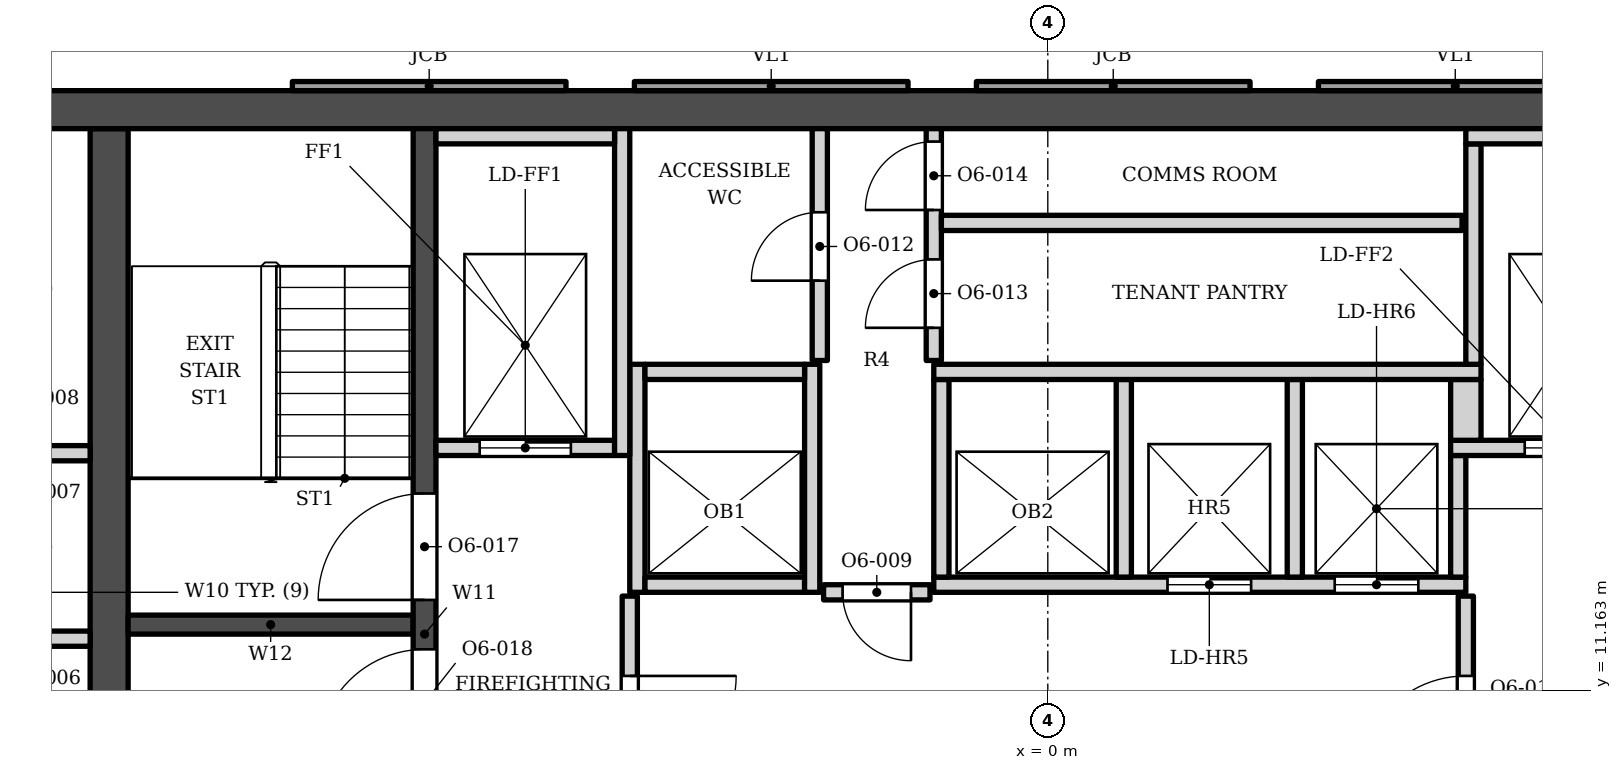
"""IFC4 building model, lengths in metres.
Left out: names, types, materials, properties, quantities, classifications, styles, units other than length and angle.
Written with IfcOpenShell. Run it as: python <this file> out.ifc"""

import sys

from ifc_helpers import new_model, si_unit, direction, frame, frame_2d, origin, place, context, subcontext, project, spatial, polyline, rectangle, outline, extrude, element, fill, save


model = new_model("IFC4")
c1 = context("Model", 3, precision=1e-05, world=origin(), true_north=direction((0.0, 1.0)))
c2 = subcontext(c1, "Body", "Model", "MODEL_VIEW")
j1 = project(units=[si_unit("LENGTHUNIT", "METRE"), si_unit("PLANEANGLEUNIT", "RADIAN")], contexts=[c1])
p1 = place(None, origin())
s1 = spatial("IfcSite", under=j1, at=p1, CompositionType="ELEMENT")
p2 = place(p1, origin())
s2 = spatial("IfcBuilding", under=s1, at=p2, CompositionType="ELEMENT")
p3 = place(p2, frame((0.0, 0.0, 208.1)))
s3 = spatial("IfcBuildingStorey", under=s2, at=p3, CompositionType="ELEMENT", Elevation=208.1)
p4 = place(p3, frame((-13.9, 18.802, 0.0), z_axis=(0.0, 0.0, 1.0), x_axis=(1.0, 0.0, 0.0)))
e1 = element("IfcWall", 1, at=p4, inside=s3, PredefinedType="SHEAR", context=c2, shape_type="SweptSolid", body=[
    extrude(rectangle(XDim=27.8, YDim=0.5, at=frame_2d((13.9, 0.0))), origin(), (0.0, 0.0, 1.0), 3.9),
])
p5 = place(p3, frame((-12.35, 5.253, 0.0), z_axis=(0.0, 0.0, 1.0), x_axis=(0.0, 1.0, 0.0)))
e2 = element("IfcWall", 2, at=p5, inside=s3, PredefinedType="SHEAR", context=c2, shape_type="SweptSolid", body=[
    extrude(rectangle(XDim=13.3, YDim=0.5, at=frame_2d((6.65, 0.0))), origin(), (0.0, 0.0, 1.0), 3.9),
])
p6 = place(p3, frame((-8.2, 5.253, 0.0), z_axis=(0.0, 0.0, 1.0), x_axis=(0.0, 1.0, 0.0)))
e3 = element("IfcWall", 3, at=p6, inside=s3, PredefinedType="SHEAR", context=c2, shape_type="SweptSolid", body=[
    extrude(rectangle(XDim=13.3, YDim=0.3, at=frame_2d((6.65, 0.0))), origin(), (0.0, 0.0, 1.0), 3.9),
])
p7 = place(p6, frame((7.1, 0.0, 0.0)))
e4 = element("IfcOpeningElement", 4, at=p7, cuts=e3, PredefinedType="OPENING", context=c2, shape_type="SweptSolid", body=[
    extrude(rectangle(XDim=1.4, YDim=2.1, at=frame_2d((0.7, 1.05))), frame((0.0, 0.16, 0.0), z_axis=(0.0, -1.0, 0.0), x_axis=(1.0, 0.0, 0.0)), (0.0, 0.0, 1.0), 0.32),
])
p8 = place(p6, frame((5.05, 0.0, 0.0)))
e5 = element("IfcOpeningElement", 5, at=p8, cuts=e3, PredefinedType="OPENING", context=c2, shape_type="SweptSolid", body=[
    extrude(rectangle(XDim=1.4, YDim=2.1, at=frame_2d((0.7, 1.05))), frame((0.0, 0.16, 0.0), z_axis=(0.0, -1.0, 0.0), x_axis=(1.0, 0.0, 0.0)), (0.0, 0.0, 1.0), 0.32),
])
p9 = place(p3, frame((-12.1, 12.028, 0.0), z_axis=(0.0, 0.0, 1.0), x_axis=(1.0, 0.0, 0.0)))
e6 = element("IfcWall", 6, at=p9, inside=s3, PredefinedType="SHEAR", context=c2, shape_type="SweptSolid", body=[
    extrude(rectangle(XDim=3.75, YDim=0.25, at=frame_2d((1.875, 0.0))), origin(), (0.0, 0.0, 1.0), 3.9),
])
p10 = place(p3, origin())
e7 = element("IfcWall", 7, at=p10, inside=s3, PredefinedType="ELEMENTEDWALL", context=c2, shape_type="SweptSolid", body=[
    extrude(outline(polyline([(3.561, 19.173), (3.561, 19.052), (7.161, 19.052), (7.161, 19.173), (3.561, 19.173)])), origin(), (0.0, 0.0, 1.0), 3.0),
])
p11 = place(p3, origin())
e8 = element("IfcWall", 8, at=p11, inside=s3, PredefinedType="SOLIDWALL", context=c2, shape_type="SweptSolid", body=[
    extrude(outline(polyline([(-0.939, 19.173), (-0.939, 19.052), (2.661, 19.052), (2.661, 19.173), (-0.939, 19.173)])), origin(), (0.0, 0.0, 1.0), 3.0),
])
p12 = place(p3, origin())
e9 = element("IfcWall", 9, at=p12, inside=s3, PredefinedType="ELEMENTEDWALL", context=c2, shape_type="SweptSolid", body=[
    extrude(outline(polyline([(-5.439, 19.173), (-5.439, 19.052), (-1.839, 19.052), (-1.839, 19.173), (-5.439, 19.173)])), origin(), (0.0, 0.0, 1.0), 3.0),
])
p13 = place(p3, origin())
e10 = element("IfcWall", 10, at=p13, inside=s3, PredefinedType="SOLIDWALL", context=c2, shape_type="SweptSolid", body=[
    extrude(outline(polyline([(-9.939, 19.173), (-9.939, 19.052), (-6.339, 19.052), (-6.339, 19.173), (-9.939, 19.173)])), origin(), (0.0, 0.0, 1.0), 3.0),
])
p14 = place(p3, frame((-5.5, 9.103, 0.0), z_axis=(0.0, 0.0, 1.0), x_axis=(0.0, 1.0, 0.0)))
e11 = element("IfcWall", 11, at=p14, inside=s3, PredefinedType="SOLIDWALL", context=c2, shape_type="SweptSolid", body=[
    extrude(rectangle(XDim=3.3, YDim=0.2, at=frame_2d((1.65, 0.0))), origin(), (0.0, 0.0, 1.0), 3.73),
])
p15 = place(p14, frame((0.85, 0.0, 0.0)))
e12 = element("IfcOpeningElement", 12, at=p15, cuts=e11, PredefinedType="OPENING", context=c2, shape_type="SweptSolid", body=[
    extrude(rectangle(XDim=1.4, YDim=2.1, at=frame_2d((0.7, 1.05))), frame((0.0, 0.11, 0.0), z_axis=(0.0, -1.0, 0.0), x_axis=(1.0, 0.0, 0.0)), (0.0, 0.0, 1.0), 0.22),
])
p16 = place(p3, frame((5.5, 9.103, 0.0), z_axis=(0.0, 0.0, 1.0), x_axis=(0.0, 1.0, 0.0)))
e13 = element("IfcWall", 13, at=p16, inside=s3, PredefinedType="SOLIDWALL", context=c2, shape_type="SweptSolid", body=[
    extrude(rectangle(XDim=3.3, YDim=0.2, at=frame_2d((1.65, 0.0))), origin(), (0.0, 0.0, 1.0), 3.73),
])
p17 = place(p16, frame((0.85, 0.0, 0.0)))
e14 = element("IfcOpeningElement", 14, at=p17, cuts=e13, PredefinedType="OPENING", context=c2, shape_type="SweptSolid", body=[
    extrude(rectangle(XDim=1.4, YDim=2.1, at=frame_2d((0.7, 1.05))), frame((0.0, 0.11, 0.0), z_axis=(0.0, -1.0, 0.0), x_axis=(1.0, 0.0, 0.0)), (0.0, 0.0, 1.0), 0.22),
])
p18 = place(p3, frame((-13.9, 11.843, 0.0), z_axis=(0.0, 0.0, 1.0), x_axis=(1.0, 0.0, 0.0)))
e15 = element("IfcWall", 15, at=p18, inside=s3, PredefinedType="SOLIDWALL", context=c2, shape_type="SweptSolid", body=[
    extrude(rectangle(XDim=1.3, YDim=0.2, at=frame_2d((0.65, 0.0))), origin(), (0.0, 0.0, 1.0), 3.73),
])
p19 = place(p3, frame((-2.95, 12.453, 0.0), z_axis=(0.0, 0.0, 1.0), x_axis=(1.0, 0.0, 0.0)))
e16 = element("IfcWall", 16, at=p19, inside=s3, PredefinedType="SOLIDWALL", context=c2, shape_type="SweptSolid", body=[
    extrude(rectangle(XDim=1.4, YDim=0.2, at=frame_2d((0.7, 0.0))), origin(), (0.0, 0.0, 1.0), 3.73),
])
p20 = place(p19, frame((0.25, 0.0, 0.0)))
e17 = element("IfcOpeningElement", 17, at=p20, cuts=e16, PredefinedType="OPENING", context=c2, shape_type="SweptSolid", body=[
    extrude(rectangle(XDim=0.9, YDim=2.1, at=frame_2d((0.45, 1.05))), frame((0.0, 0.11, 0.0), z_axis=(0.0, -1.0, 0.0), x_axis=(1.0, 0.0, 0.0)), (0.0, 0.0, 1.0), 0.22),
])
p21 = place(p3, frame((-5.4, 12.453, 0.0), z_axis=(0.0, 0.0, 1.0), x_axis=(0.0, 1.0, 0.0)))
e18 = element("IfcWall", 18, at=p21, inside=s3, PredefinedType="SOLIDWALL", context=c2, shape_type="SweptSolid", body=[
    extrude(rectangle(XDim=3.0, YDim=0.2, at=frame_2d((1.5, 0.0))), origin(), (0.0, 0.0, 1.0), 3.73),
])
p22 = place(p3, frame((-5.3, 12.552, 0.0), z_axis=(0.0, 0.0, 1.0), x_axis=(1.0, 0.0, 0.0)))
e19 = element("IfcWall", 19, at=p22, inside=s3, PredefinedType="SOLIDWALL", context=c2, shape_type="SweptSolid", body=[
    extrude(rectangle(XDim=2.1, YDim=0.2, at=frame_2d((1.05, 0.0))), origin(), (0.0, 0.0, 1.0), 3.73),
])
p23 = place(p3, frame((-3.1, 12.453, 0.0), z_axis=(0.0, 0.0, 1.0), x_axis=(0.0, 1.0, 0.0)))
e20 = element("IfcWall", 20, at=p23, inside=s3, PredefinedType="SOLIDWALL", context=c2, shape_type="SweptSolid", body=[
    extrude(rectangle(XDim=3.0, YDim=0.2, at=frame_2d((1.5, 0.0))), origin(), (0.0, 0.0, 1.0), 3.73),
])
p24 = place(p3, frame((-1.5, 12.552, 0.0), z_axis=(0.0, 0.0, 1.0), x_axis=(1.0, 0.0, 0.0)))
e21 = element("IfcWall", 21, at=p24, inside=s3, PredefinedType="SOLIDWALL", context=c2, shape_type="SweptSolid", body=[
    extrude(rectangle(XDim=7.0, YDim=0.2, at=frame_2d((3.5, 0.0))), origin(), (0.0, 0.0, 1.0), 3.73),
])
p25 = place(p24, frame((3.075, 0.0, 0.0)))
e22 = element("IfcOpeningElement", 22, at=p25, cuts=e21, PredefinedType="OPENING", context=c2, shape_type="SweptSolid", body=[
    extrude(rectangle(XDim=1.1, YDim=2.1, at=frame_2d((0.55, 1.05))), frame((0.0, 0.11, 0.0), z_axis=(0.0, -1.0, 0.0), x_axis=(1.0, 0.0, 0.0)), (0.0, 0.0, 1.0), 0.22),
])
p26 = place(p24, frame((5.275, 0.0, 0.0)))
e23 = element("IfcOpeningElement", 23, at=p26, cuts=e21, PredefinedType="OPENING", context=c2, shape_type="SweptSolid", body=[
    extrude(rectangle(XDim=1.1, YDim=2.1, at=frame_2d((0.55, 1.05))), frame((0.0, 0.11, 0.0), z_axis=(0.0, -1.0, 0.0), x_axis=(1.0, 0.0, 0.0)), (0.0, 0.0, 1.0), 0.22),
])
for number, where, z_axis, x_axis in (
    (24, (-1.4, 12.653, 0.0), (0.0, 0.0, 1.0), (0.0, 1.0, 0.0)),
    (25, (1.0, 12.653, 0.0), (0.0, 0.0, 1.0), (0.0, 1.0, 0.0)),
    (26, (3.25, 12.653, 0.0), (0.0, 0.0, 1.0), (0.0, 1.0, 0.0)),
):
    element("IfcWall", number, at=place(p3, frame(where, z_axis=z_axis, x_axis=x_axis)), inside=s3, PredefinedType="SOLIDWALL", context=c2, shape_type="SweptSolid", body=[
        extrude(rectangle(XDim=2.6, YDim=0.2, at=frame_2d((1.3, 0.0))), origin(), (0.0, 0.0, 1.0), 3.73),
    ])
p27 = place(p3, frame((5.4, 12.653, 0.0), z_axis=(0.0, 0.0, 1.0), x_axis=(0.0, 1.0, 0.0)))
e27 = element("IfcWall", 27, at=p27, inside=s3, PredefinedType="SOLIDWALL", context=c2, shape_type="SweptSolid", body=[
    extrude(rectangle(XDim=1.6, YDim=0.2, at=frame_2d((0.8, 0.0))), origin(), (0.0, 0.0, 1.0), 3.73),
])
p28 = place(p3, frame((-13.9, 14.283, 0.0), z_axis=(0.0, 0.0, 1.0), x_axis=(1.0, 0.0, 0.0)))
e28 = element("IfcWall", 28, at=p28, inside=s3, PredefinedType="SOLIDWALL", context=c2, shape_type="SweptSolid", body=[
    extrude(rectangle(XDim=1.3, YDim=0.2, at=frame_2d((0.65, 0.0))), origin(), (0.0, 0.0, 1.0), 3.73),
])
p29 = place(p3, frame((-8.05, 14.353, 0.0), z_axis=(0.0, 0.0, 1.0), x_axis=(1.0, 0.0, 0.0)))
e29 = element("IfcWall", 29, at=p29, inside=s3, PredefinedType="SOLIDWALL", context=c2, shape_type="SweptSolid", body=[
    extrude(rectangle(XDim=2.35, YDim=0.2, at=frame_2d((1.175, 0.0))), origin(), (0.0, 0.0, 1.0), 3.73),
])
p30 = place(p29, frame((0.575, 0.0, 0.0)))
e30 = element("IfcOpeningElement", 30, at=p30, cuts=e29, PredefinedType="OPENING", context=c2, shape_type="SweptSolid", body=[
    extrude(rectangle(XDim=1.2, YDim=2.1, at=frame_2d((0.6, 1.05))), frame((0.0, 0.11, 0.0), z_axis=(0.0, -1.0, 0.0), x_axis=(1.0, 0.0, 0.0)), (0.0, 0.0, 1.0), 0.22),
])
p31 = place(p3, frame((-5.6, 14.253, 0.0), z_axis=(0.0, 0.0, 1.0), x_axis=(0.0, 1.0, 0.0)))
e31 = element("IfcWall", 31, at=p31, inside=s3, PredefinedType="SOLIDWALL", context=c2, shape_type="SweptSolid", body=[
    extrude(rectangle(XDim=4.3, YDim=0.2, at=frame_2d((2.15, 0.0))), origin(), (0.0, 0.0, 1.0), 3.73),
])
p32 = place(p3, frame((5.3, 14.353, 0.0), z_axis=(0.0, 0.0, 1.0), x_axis=(1.0, 0.0, 0.0)))
e32 = element("IfcWall", 32, at=p32, inside=s3, PredefinedType="SOLIDWALL", context=c2, shape_type="SweptSolid", body=[
    extrude(rectangle(XDim=2.75, YDim=0.2, at=frame_2d((1.375, 0.0))), origin(), (0.0, 0.0, 1.0), 3.73),
])
p33 = place(p32, frame((0.975, 0.0, 0.0)))
e33 = element("IfcOpeningElement", 33, at=p33, cuts=e32, PredefinedType="OPENING", context=c2, shape_type="SweptSolid", body=[
    extrude(rectangle(XDim=1.2, YDim=2.1, at=frame_2d((0.6, 1.05))), frame((0.0, 0.11, 0.0), z_axis=(0.0, -1.0, 0.0), x_axis=(1.0, 0.0, 0.0)), (0.0, 0.0, 1.0), 0.22),
])
p34 = place(p3, frame((5.5, 14.453, 0.0), z_axis=(0.0, 0.0, 1.0), x_axis=(0.0, 1.0, 0.0)))
e34 = element("IfcWall", 34, at=p34, inside=s3, PredefinedType="SOLIDWALL", context=c2, shape_type="SweptSolid", body=[
    extrude(rectangle(XDim=0.8, YDim=0.4, at=frame_2d((0.4, 0.0))), origin(), (0.0, 0.0, 1.0), 3.73),
])
p35 = place(p3, frame((-5.3, 15.353, 0.0), z_axis=(0.0, 0.0, 1.0), x_axis=(1.0, 0.0, 0.0)))
e35 = element("IfcWall", 35, at=p35, inside=s3, PredefinedType="SOLIDWALL", context=c2, shape_type="SweptSolid", body=[
    extrude(rectangle(XDim=2.1, YDim=0.2, at=frame_2d((1.05, 0.0))), origin(), (0.0, 0.0, 1.0), 3.73),
])
p36 = place(p3, frame((-1.5, 15.353, 0.0), z_axis=(0.0, 0.0, 1.0), x_axis=(1.0, 0.0, 0.0)))
e36 = element("IfcWall", 36, at=p36, inside=s3, PredefinedType="SOLIDWALL", context=c2, shape_type="SweptSolid", body=[
    extrude(rectangle(XDim=7.2, YDim=0.2, at=frame_2d((3.6, 0.0))), origin(), (0.0, 0.0, 1.0), 3.73),
])
p37 = place(p3, frame((5.6, 15.453, 0.0), z_axis=(0.0, 0.0, 1.0), x_axis=(0.0, 1.0, 0.0)))
e37 = element("IfcWall", 37, at=p37, inside=s3, PredefinedType="SOLIDWALL", context=c2, shape_type="SweptSolid", body=[
    extrude(rectangle(XDim=2.9, YDim=0.2, at=frame_2d((1.45, 0.0))), origin(), (0.0, 0.0, 1.0), 3.73),
])
p38 = place(p3, frame((-3.0, 15.503, 0.0), z_axis=(0.0, 0.0, 1.0), x_axis=(0.0, 1.0, 0.0)))
e38 = element("IfcWall", 38, at=p38, inside=s3, PredefinedType="SOLIDWALL", context=c2, shape_type="SweptSolid", body=[
    extrude(rectangle(XDim=3.05, YDim=0.2, at=frame_2d((1.525, 0.0))), origin(), (0.0, 0.0, 1.0), 3.73),
])
p39 = place(p38, frame((1.05, 0.0, 0.0)))
e39 = element("IfcOpeningElement", 39, at=p39, cuts=e38, PredefinedType="OPENING", context=c2, shape_type="SweptSolid", body=[
    extrude(rectangle(XDim=0.9, YDim=2.1, at=frame_2d((0.45, 1.05))), frame((0.0, 0.11, 0.0), z_axis=(0.0, -1.0, 0.0), x_axis=(1.0, 0.0, 0.0)), (0.0, 0.0, 1.0), 0.22),
])
p40 = place(p3, frame((-1.5, 15.503, 0.0), z_axis=(0.0, 0.0, 1.0), x_axis=(0.0, 1.0, 0.0)))
e40 = element("IfcWall", 40, at=p40, inside=s3, PredefinedType="SOLIDWALL", context=c2, shape_type="SweptSolid", body=[
    extrude(rectangle(XDim=3.05, YDim=0.2, at=frame_2d((1.525, 0.0))), origin(), (0.0, 0.0, 1.0), 3.73),
])
p41 = place(p40, frame((0.43, 0.0, 0.0)))
e41 = element("IfcOpeningElement", 41, at=p41, cuts=e40, PredefinedType="OPENING", context=c2, shape_type="SweptSolid", body=[
    extrude(rectangle(XDim=0.9, YDim=2.1, at=frame_2d((0.45, 1.05))), frame((0.0, 0.11, 0.0), z_axis=(0.0, -1.0, 0.0), x_axis=(1.0, 0.0, 0.0)), (0.0, 0.0, 1.0), 0.22),
])
p42 = place(p40, frame((1.98, 0.0, 0.0)))
e42 = element("IfcOpeningElement", 42, at=p42, cuts=e40, PredefinedType="OPENING", context=c2, shape_type="SweptSolid", body=[
    extrude(rectangle(XDim=0.9, YDim=2.1, at=frame_2d((0.45, 1.05))), frame((0.0, 0.11, 0.0), z_axis=(0.0, -1.0, 0.0), x_axis=(1.0, 0.0, 0.0)), (0.0, 0.0, 1.0), 0.22),
])
p43 = place(p3, frame((-1.4, 17.312, 0.0), z_axis=(0.0, 0.0, 1.0), x_axis=(1.0, 0.0, 0.0)))
e43 = element("IfcWall", 43, at=p43, inside=s3, PredefinedType="SOLIDWALL", context=c2, shape_type="SweptSolid", body=[
    extrude(rectangle(XDim=6.85, YDim=0.2, at=frame_2d((3.425, 0.0))), origin(), (0.0, 0.0, 1.0), 3.73),
])
p44 = place(p3, frame((-8.05, 18.453, 0.0), z_axis=(0.0, 0.0, 1.0), x_axis=(1.0, 0.0, 0.0)))
e44 = element("IfcWall", 44, at=p44, inside=s3, PredefinedType="SOLIDWALL", context=c2, shape_type="SweptSolid", body=[
    extrude(rectangle(XDim=2.35, YDim=0.2, at=frame_2d((1.175, 0.0))), origin(), (0.0, 0.0, 1.0), 3.73),
])
p45 = place(p3, frame((5.5, 18.453, 0.0), z_axis=(0.0, 0.0, 1.0), x_axis=(1.0, 0.0, 0.0)))
e45 = element("IfcWall", 45, at=p45, inside=s3, PredefinedType="SOLIDWALL", context=c2, shape_type="SweptSolid", body=[
    extrude(rectangle(XDim=2.55, YDim=0.2, at=frame_2d((1.275, 0.0))), origin(), (0.0, 0.0, 1.0), 3.73),
])
p46 = place(p25, origin())
e46 = element("IfcDoor", 46, at=p46, inside=s3, OperationType="DOUBLE_DOOR_SLIDING", PredefinedType="DOOR", context=c2, shape_type="SweptSolid", body=[
    extrude(rectangle(XDim=1.1, YDim=2.1, at=frame_2d((0.55, 1.05))), frame((0.0, 0.025, 0.0), z_axis=(0.0, -1.0, 0.0), x_axis=(1.0, 0.0, 0.0)), (0.0, 0.0, 1.0), 0.05),
])
fill(e22, e46)
p47 = place(p26, origin())
e47 = element("IfcDoor", 47, at=p47, inside=s3, OperationType="DOUBLE_DOOR_SLIDING", PredefinedType="DOOR", context=c2, shape_type="SweptSolid", body=[
    extrude(rectangle(XDim=1.1, YDim=2.1, at=frame_2d((0.55, 1.05))), frame((0.0, 0.025, 0.0), z_axis=(0.0, -1.0, 0.0), x_axis=(1.0, 0.0, 0.0)), (0.0, 0.0, 1.0), 0.05),
])
fill(e23, e47)
p48 = place(p30, origin())
e48 = element("IfcDoor", 48, at=p48, inside=s3, OperationType="DOUBLE_DOOR_SLIDING", PredefinedType="DOOR", context=c2, shape_type="SweptSolid", body=[
    extrude(rectangle(XDim=1.2, YDim=2.1, at=frame_2d((0.6, 1.05))), frame((0.0, 0.025, 0.0), z_axis=(0.0, -1.0, 0.0), x_axis=(1.0, 0.0, 0.0)), (0.0, 0.0, 1.0), 0.05),
])
fill(e30, e48)
p49 = place(p33, origin())
e49 = element("IfcDoor", 49, at=p49, inside=s3, OperationType="DOUBLE_DOOR_SLIDING", PredefinedType="DOOR", context=c2, shape_type="SweptSolid", body=[
    extrude(rectangle(XDim=1.2, YDim=2.1, at=frame_2d((0.6, 1.05))), frame((0.0, 0.025, 0.0), z_axis=(0.0, -1.0, 0.0), x_axis=(1.0, 0.0, 0.0)), (0.0, 0.0, 1.0), 0.05),
])
fill(e33, e49)
p50 = place(p7, origin())
e50 = element("IfcDoor", 50, at=p50, inside=s3, OperationType="SINGLE_SWING_LEFT", PredefinedType="DOOR", context=c2, shape_type="SweptSolid", body=[
    extrude(rectangle(XDim=1.4, YDim=2.1, at=frame_2d((0.7, 1.05))), frame((0.0, 0.025, 0.0), z_axis=(0.0, -1.0, 0.0), x_axis=(1.0, 0.0, 0.0)), (0.0, 0.0, 1.0), 0.05),
])
fill(e4, e50)
p51 = place(p8, origin())
e51 = element("IfcDoor", 51, at=p51, inside=s3, OperationType="SINGLE_SWING_LEFT", PredefinedType="DOOR", context=c2, shape_type="SweptSolid", body=[
    extrude(rectangle(XDim=1.4, YDim=2.1, at=frame_2d((0.7, 1.05))), frame((0.0, 0.025, 0.0), z_axis=(0.0, -1.0, 0.0), x_axis=(1.0, 0.0, 0.0)), (0.0, 0.0, 1.0), 0.05),
])
fill(e5, e51)
p52 = place(p20, origin())
e52 = element("IfcDoor", 52, at=p52, inside=s3, OperationType="SINGLE_SWING_RIGHT", PredefinedType="DOOR", context=c2, shape_type="SweptSolid", body=[
    extrude(rectangle(XDim=0.9, YDim=2.1, at=frame_2d((0.45, 1.05))), frame((0.0, 0.025, 0.0), z_axis=(0.0, -1.0, 0.0), x_axis=(1.0, 0.0, 0.0)), (0.0, 0.0, 1.0), 0.05),
])
fill(e17, e52)
p53 = place(p15, origin())
e53 = element("IfcDoor", 53, at=p53, inside=s3, OperationType="SINGLE_SWING_RIGHT", PredefinedType="DOOR", context=c2, shape_type="SweptSolid", body=[
    extrude(rectangle(XDim=1.4, YDim=2.1, at=frame_2d((0.7, 1.05))), frame((0.0, 0.025, 0.0), z_axis=(0.0, -1.0, 0.0), x_axis=(1.0, 0.0, 0.0)), (0.0, 0.0, 1.0), 0.05),
])
fill(e12, e53)
p54 = place(p17, origin())
e54 = element("IfcDoor", 54, at=p54, inside=s3, OperationType="SINGLE_SWING_LEFT", PredefinedType="DOOR", context=c2, shape_type="SweptSolid", body=[
    extrude(rectangle(XDim=1.4, YDim=2.1, at=frame_2d((0.7, 1.05))), frame((0.0, 0.025, 0.0), z_axis=(0.0, -1.0, 0.0), x_axis=(1.0, 0.0, 0.0)), (0.0, 0.0, 1.0), 0.05),
])
fill(e14, e54)
p55 = place(p39, origin())
e55 = element("IfcDoor", 55, at=p55, inside=s3, OperationType="SINGLE_SWING_LEFT", PredefinedType="DOOR", context=c2, shape_type="SweptSolid", body=[
    extrude(rectangle(XDim=0.9, YDim=2.1, at=frame_2d((0.45, 1.05))), frame((0.0, 0.025, 0.0), z_axis=(0.0, -1.0, 0.0), x_axis=(1.0, 0.0, 0.0)), (0.0, 0.0, 1.0), 0.05),
])
fill(e39, e55)
p56 = place(p41, origin())
e56 = element("IfcDoor", 56, at=p56, inside=s3, OperationType="SINGLE_SWING_LEFT", PredefinedType="DOOR", context=c2, shape_type="SweptSolid", body=[
    extrude(rectangle(XDim=0.9, YDim=2.1, at=frame_2d((0.45, 1.05))), frame((0.0, 0.025, 0.0), z_axis=(0.0, -1.0, 0.0), x_axis=(1.0, 0.0, 0.0)), (0.0, 0.0, 1.0), 0.05),
])
fill(e41, e56)
p57 = place(p42, origin())
e57 = element("IfcDoor", 57, at=p57, inside=s3, OperationType="SINGLE_SWING_LEFT", PredefinedType="DOOR", context=c2, shape_type="SweptSolid", body=[
    extrude(rectangle(XDim=0.9, YDim=2.1, at=frame_2d((0.45, 1.05))), frame((0.0, 0.025, 0.0), z_axis=(0.0, -1.0, 0.0), x_axis=(1.0, 0.0, 0.0)), (0.0, 0.0, 1.0), 0.05),
])
fill(e42, e57)
save(model, sys.argv[1])
